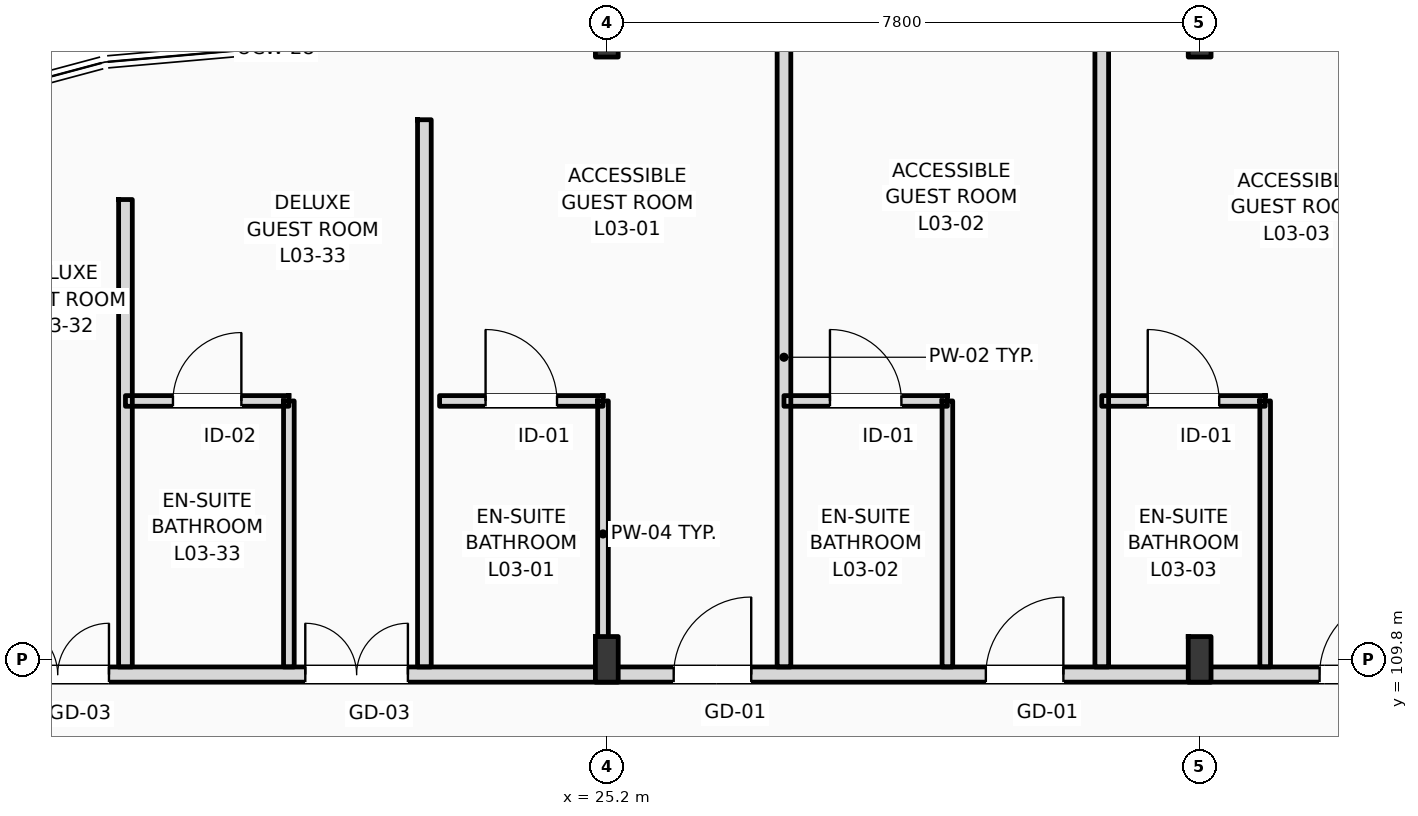
"""IFC4 building model, lengths in metres.
Left out: names, types, materials, properties, quantities, classifications, styles, units other than length and angle.
Written with IfcOpenShell. Run it as: python <this file> out.ifc"""

import sys

from ifc_helpers import new_model, si_unit, direction, frame, frame_2d, origin, origin_2d, place, context, subcontext, project, spatial, rectangle, i_section, extrude, element, fill, save


model = new_model("IFC4")
c1 = context("Model", 3, precision=1e-05, world=origin(), true_north=direction((0.0, 1.0)))
c2 = subcontext(c1, "Body", "Model", "MODEL_VIEW")
j1 = project(units=[si_unit("LENGTHUNIT", "METRE"), si_unit("PLANEANGLEUNIT", "RADIAN")], contexts=[c1])
p1 = place(None, origin())
s1 = spatial("IfcSite", under=j1, at=p1, CompositionType="ELEMENT")
p2 = place(p1, origin())
s2 = spatial("IfcBuilding", under=s1, at=p2, CompositionType="ELEMENT")
p3 = place(p2, frame((0.0, 0.0, 16.2)))
s3 = spatial("IfcBuildingStorey", under=s2, at=p3, CompositionType="ELEMENT", Elevation=16.2)
p4 = place(p3, frame((25.2, 109.8, 0.0), z_axis=(0.0, 0.0, 1.0), x_axis=(1.0, 0.0, 0.0)))
e1 = element("IfcColumn", 1, at=p4, inside=s3, PredefinedType="COLUMN", context=c2, shape_type="SweptSolid", body=[
    extrude(i_section(OverallWidth=0.3, OverallDepth=0.6, WebThickness=0.015, FlangeThickness=0.03, FilletRadius=0.027, at=origin_2d()), origin(), (0.0, 0.0, 1.0), 4.2),
])
p5 = place(p3, frame((25.2, 118.0, 0.0), z_axis=(0.0, 0.0, 1.0), x_axis=(1.0, 0.0, 0.0)))
e2 = element("IfcColumn", 2, at=p5, inside=s3, PredefinedType="COLUMN", context=c2, shape_type="SweptSolid", body=[
    extrude(i_section(OverallWidth=0.3, OverallDepth=0.55, WebThickness=0.015, FlangeThickness=0.029, FilletRadius=0.027, at=origin_2d()), origin(), (0.0, 0.0, 1.0), 4.2),
])
p6 = place(p3, frame((33.0, 109.8, 0.0), z_axis=(0.0, 0.0, 1.0), x_axis=(1.0, 0.0, 0.0)))
e3 = element("IfcColumn", 3, at=p6, inside=s3, PredefinedType="COLUMN", context=c2, shape_type="SweptSolid", body=[
    extrude(i_section(OverallWidth=0.3, OverallDepth=0.6, WebThickness=0.015, FlangeThickness=0.03, FilletRadius=0.027, at=origin_2d()), origin(), (0.0, 0.0, 1.0), 4.2),
])
p7 = place(p3, frame((33.0, 118.0, 0.0), z_axis=(0.0, 0.0, 1.0), x_axis=(1.0, 0.0, 0.0)))
e4 = element("IfcColumn", 4, at=p7, inside=s3, PredefinedType="COLUMN", context=c2, shape_type="SweptSolid", body=[
    extrude(i_section(OverallWidth=0.3, OverallDepth=0.55, WebThickness=0.015, FlangeThickness=0.029, FilletRadius=0.027, at=origin_2d()), origin(), (0.0, 0.0, 1.0), 4.2),
])
p8 = place(p3, frame((10.65, 109.6, 0.0), z_axis=(0.0, 0.0, 1.0), x_axis=(1.0, 0.0, 0.0)))
e5 = element("IfcWall", 5, at=p8, inside=s3, PredefinedType="PARTITIONING", context=c2, shape_type="SweptSolid", body=[
    extrude(rectangle(XDim=109.21, YDim=0.2, at=frame_2d((54.605, 0.0))), origin(), (0.0, 0.0, 1.0), 3.36),
])
p9 = place(p8, frame((15.43, 0.0, 0.0)))
e6 = element("IfcOpeningElement", 6, at=p9, cuts=e5, PredefinedType="OPENING", context=c2, shape_type="SweptSolid", body=[
    extrude(rectangle(XDim=1.02, YDim=2.2, at=frame_2d((0.51, 1.1))), frame((0.0, 0.11, 0.0), z_axis=(0.0, -1.0, 0.0), x_axis=(1.0, 0.0, 0.0)), (0.0, 0.0, 1.0), 0.22),
])
p10 = place(p8, frame((19.537, 0.0, 0.0)))
e7 = element("IfcOpeningElement", 7, at=p10, cuts=e5, PredefinedType="OPENING", context=c2, shape_type="SweptSolid", body=[
    extrude(rectangle(XDim=1.02, YDim=2.2, at=frame_2d((0.51, 1.1))), frame((0.0, 0.11, 0.0), z_axis=(0.0, -1.0, 0.0), x_axis=(1.0, 0.0, 0.0)), (0.0, 0.0, 1.0), 0.22),
])
p11 = place(p8, frame((23.928, 0.0, 0.0)))
e8 = element("IfcOpeningElement", 8, at=p11, cuts=e5, PredefinedType="OPENING", context=c2, shape_type="SweptSolid", body=[
    extrude(rectangle(XDim=1.02, YDim=2.2, at=frame_2d((0.51, 1.1))), frame((0.0, 0.11, 0.0), z_axis=(0.0, -1.0, 0.0), x_axis=(1.0, 0.0, 0.0)), (0.0, 0.0, 1.0), 0.22),
])
p12 = place(p8, frame((26.169, 0.0, 0.0)))
e9 = element("IfcOpeningElement", 9, at=p12, cuts=e5, PredefinedType="OPENING", context=c2, shape_type="SweptSolid", body=[
    extrude(rectangle(XDim=1.02, YDim=2.2, at=frame_2d((0.51, 1.1))), frame((0.0, 0.11, 0.0), z_axis=(0.0, -1.0, 0.0), x_axis=(1.0, 0.0, 0.0)), (0.0, 0.0, 1.0), 0.22),
])
p13 = place(p8, frame((32.739, 0.0, 0.0)))
e10 = element("IfcOpeningElement", 10, at=p13, cuts=e5, PredefinedType="OPENING", context=c2, shape_type="SweptSolid", body=[
    extrude(rectangle(XDim=0.96, YDim=2.2, at=frame_2d((0.48, 1.1))), frame((0.0, 0.11, 0.0), z_axis=(0.0, -1.0, 0.0), x_axis=(1.0, 0.0, 0.0)), (0.0, 0.0, 1.0), 0.22),
])
p14 = place(p8, frame((34.98, 0.0, 0.0)))
e11 = element("IfcOpeningElement", 11, at=p14, cuts=e5, PredefinedType="OPENING", context=c2, shape_type="SweptSolid", body=[
    extrude(rectangle(XDim=0.96, YDim=2.2, at=frame_2d((0.48, 1.1))), frame((0.0, 0.11, 0.0), z_axis=(0.0, -1.0, 0.0), x_axis=(1.0, 0.0, 0.0)), (0.0, 0.0, 1.0), 0.22),
])
p15 = place(p8, frame((41.521, 0.0, 0.0)))
e12 = element("IfcOpeningElement", 12, at=p15, cuts=e5, PredefinedType="OPENING", context=c2, shape_type="SweptSolid", body=[
    extrude(rectangle(XDim=0.96, YDim=2.2, at=frame_2d((0.48, 1.1))), frame((0.0, 0.11, 0.0), z_axis=(0.0, -1.0, 0.0), x_axis=(1.0, 0.0, 0.0)), (0.0, 0.0, 1.0), 0.22),
])
p16 = place(p8, frame((43.512, 0.0, 0.0)))
e13 = element("IfcOpeningElement", 13, at=p16, cuts=e5, PredefinedType="OPENING", context=c2, shape_type="SweptSolid", body=[
    extrude(rectangle(XDim=0.96, YDim=2.2, at=frame_2d((0.48, 1.1))), frame((0.0, 0.11, 0.0), z_axis=(0.0, -1.0, 0.0), x_axis=(1.0, 0.0, 0.0)), (0.0, 0.0, 1.0), 0.22),
])
p17 = place(p8, frame((50.303, 0.0, 0.0)))
e14 = element("IfcOpeningElement", 14, at=p17, cuts=e5, PredefinedType="OPENING", context=c2, shape_type="SweptSolid", body=[
    extrude(rectangle(XDim=0.96, YDim=2.2, at=frame_2d((0.48, 1.1))), frame((0.0, 0.11, 0.0), z_axis=(0.0, -1.0, 0.0), x_axis=(1.0, 0.0, 0.0)), (0.0, 0.0, 1.0), 0.22),
])
p18 = place(p8, frame((54.944, 0.0, 0.0)))
e15 = element("IfcOpeningElement", 15, at=p18, cuts=e5, PredefinedType="OPENING", context=c2, shape_type="SweptSolid", body=[
    extrude(rectangle(XDim=0.96, YDim=2.2, at=frame_2d((0.48, 1.1))), frame((0.0, 0.11, 0.0), z_axis=(0.0, -1.0, 0.0), x_axis=(1.0, 0.0, 0.0)), (0.0, 0.0, 1.0), 0.22),
])
p19 = place(p8, frame((59.085, 0.0, 0.0)))
e16 = element("IfcOpeningElement", 16, at=p19, cuts=e5, PredefinedType="OPENING", context=c2, shape_type="SweptSolid", body=[
    extrude(rectangle(XDim=0.96, YDim=2.2, at=frame_2d((0.48, 1.1))), frame((0.0, 0.11, 0.0), z_axis=(0.0, -1.0, 0.0), x_axis=(1.0, 0.0, 0.0)), (0.0, 0.0, 1.0), 0.22),
])
p20 = place(p8, frame((63.476, 0.0, 0.0)))
e17 = element("IfcOpeningElement", 17, at=p20, cuts=e5, PredefinedType="OPENING", context=c2, shape_type="SweptSolid", body=[
    extrude(rectangle(XDim=0.96, YDim=2.2, at=frame_2d((0.48, 1.1))), frame((0.0, 0.11, 0.0), z_axis=(0.0, -1.0, 0.0), x_axis=(1.0, 0.0, 0.0)), (0.0, 0.0, 1.0), 0.22),
])
p21 = place(p8, frame((65.716, 0.0, 0.0)))
e18 = element("IfcOpeningElement", 18, at=p21, cuts=e5, PredefinedType="OPENING", context=c2, shape_type="SweptSolid", body=[
    extrude(rectangle(XDim=0.96, YDim=2.2, at=frame_2d((0.48, 1.1))), frame((0.0, 0.11, 0.0), z_axis=(0.0, -1.0, 0.0), x_axis=(1.0, 0.0, 0.0)), (0.0, 0.0, 1.0), 0.22),
])
p22 = place(p8, frame((72.257, 0.0, 0.0)))
e19 = element("IfcOpeningElement", 19, at=p22, cuts=e5, PredefinedType="OPENING", context=c2, shape_type="SweptSolid", body=[
    extrude(rectangle(XDim=0.96, YDim=2.2, at=frame_2d((0.48, 1.1))), frame((0.0, 0.11, 0.0), z_axis=(0.0, -1.0, 0.0), x_axis=(1.0, 0.0, 0.0)), (0.0, 0.0, 1.0), 0.22),
])
p23 = place(p8, frame((74.498, 0.0, 0.0)))
e20 = element("IfcOpeningElement", 20, at=p23, cuts=e5, PredefinedType="OPENING", context=c2, shape_type="SweptSolid", body=[
    extrude(rectangle(XDim=0.96, YDim=2.2, at=frame_2d((0.48, 1.1))), frame((0.0, 0.11, 0.0), z_axis=(0.0, -1.0, 0.0), x_axis=(1.0, 0.0, 0.0)), (0.0, 0.0, 1.0), 0.22),
])
p24 = place(p8, frame((81.039, 0.0, 0.0)))
e21 = element("IfcOpeningElement", 21, at=p24, cuts=e5, PredefinedType="OPENING", context=c2, shape_type="SweptSolid", body=[
    extrude(rectangle(XDim=0.96, YDim=2.2, at=frame_2d((0.48, 1.1))), frame((0.0, 0.11, 0.0), z_axis=(0.0, -1.0, 0.0), x_axis=(1.0, 0.0, 0.0)), (0.0, 0.0, 1.0), 0.22),
])
p25 = place(p8, frame((85.68, 0.0, 0.0)))
e22 = element("IfcOpeningElement", 22, at=p25, cuts=e5, PredefinedType="OPENING", context=c2, shape_type="SweptSolid", body=[
    extrude(rectangle(XDim=0.96, YDim=2.2, at=frame_2d((0.48, 1.1))), frame((0.0, 0.11, 0.0), z_axis=(0.0, -1.0, 0.0), x_axis=(1.0, 0.0, 0.0)), (0.0, 0.0, 1.0), 0.22),
])
p26 = place(p8, frame((89.82, 0.0, 0.0)))
e23 = element("IfcOpeningElement", 23, at=p26, cuts=e5, PredefinedType="OPENING", context=c2, shape_type="SweptSolid", body=[
    extrude(rectangle(XDim=0.96, YDim=2.2, at=frame_2d((0.48, 1.1))), frame((0.0, 0.11, 0.0), z_axis=(0.0, -1.0, 0.0), x_axis=(1.0, 0.0, 0.0)), (0.0, 0.0, 1.0), 0.22),
])
p27 = place(p8, frame((94.211, 0.0, 0.0)))
e24 = element("IfcOpeningElement", 24, at=p27, cuts=e5, PredefinedType="OPENING", context=c2, shape_type="SweptSolid", body=[
    extrude(rectangle(XDim=0.96, YDim=2.2, at=frame_2d((0.48, 1.1))), frame((0.0, 0.11, 0.0), z_axis=(0.0, -1.0, 0.0), x_axis=(1.0, 0.0, 0.0)), (0.0, 0.0, 1.0), 0.22),
])
p28 = place(p8, frame((98.602, 0.0, 0.0)))
e25 = element("IfcOpeningElement", 25, at=p28, cuts=e5, PredefinedType="OPENING", context=c2, shape_type="SweptSolid", body=[
    extrude(rectangle(XDim=0.96, YDim=2.2, at=frame_2d((0.48, 1.1))), frame((0.0, 0.11, 0.0), z_axis=(0.0, -1.0, 0.0), x_axis=(1.0, 0.0, 0.0)), (0.0, 0.0, 1.0), 0.22),
])
p29 = place(p8, frame((102.993, 0.0, 0.0)))
e26 = element("IfcOpeningElement", 26, at=p29, cuts=e5, PredefinedType="OPENING", context=c2, shape_type="SweptSolid", body=[
    extrude(rectangle(XDim=0.96, YDim=2.2, at=frame_2d((0.48, 1.1))), frame((0.0, 0.11, 0.0), z_axis=(0.0, -1.0, 0.0), x_axis=(1.0, 0.0, 0.0)), (0.0, 0.0, 1.0), 0.22),
])
p30 = place(p8, frame((105.269, 0.0, 0.0)))
e27 = element("IfcOpeningElement", 27, at=p30, cuts=e5, PredefinedType="OPENING", context=c2, shape_type="SweptSolid", body=[
    extrude(rectangle(XDim=0.96, YDim=2.2, at=frame_2d((0.48, 1.1))), frame((0.0, 0.11, 0.0), z_axis=(0.0, -1.0, 0.0), x_axis=(1.0, 0.0, 0.0)), (0.0, 0.0, 1.0), 0.22),
])
p31 = place(p8, frame((2.716, 0.0, 0.0)))
e28 = element("IfcOpeningElement", 28, at=p31, cuts=e5, PredefinedType="OPENING", context=c2, shape_type="SweptSolid", body=[
    extrude(rectangle(XDim=1.35, YDim=2.25, at=frame_2d((0.675, 1.125))), frame((0.0, 0.11, 0.0), z_axis=(0.0, -1.0, 0.0), x_axis=(1.0, 0.0, 0.0)), (0.0, 0.0, 1.0), 0.22),
])
p32 = place(p8, frame((6.65, 0.0, 0.0)))
e29 = element("IfcOpeningElement", 29, at=p32, cuts=e5, PredefinedType="OPENING", context=c2, shape_type="SweptSolid", body=[
    extrude(rectangle(XDim=1.35, YDim=2.25, at=frame_2d((0.675, 1.125))), frame((0.0, 0.11, 0.0), z_axis=(0.0, -1.0, 0.0), x_axis=(1.0, 0.0, 0.0)), (0.0, 0.0, 1.0), 0.22),
])
p33 = place(p8, frame((10.583, 0.0, 0.0)))
e30 = element("IfcOpeningElement", 30, at=p33, cuts=e5, PredefinedType="OPENING", context=c2, shape_type="SweptSolid", body=[
    extrude(rectangle(XDim=1.35, YDim=2.25, at=frame_2d((0.675, 1.125))), frame((0.0, 0.11, 0.0), z_axis=(0.0, -1.0, 0.0), x_axis=(1.0, 0.0, 0.0)), (0.0, 0.0, 1.0), 0.22),
])
p34 = place(p3, frame((27.531, 109.7, 0.0), z_axis=(0.0, 0.0, 1.0), x_axis=(0.0, 1.0, 0.0)))
e31 = element("IfcWall", 31, at=p34, inside=s3, PredefinedType="PARTITIONING", context=c2, shape_type="SweptSolid", body=[
    extrude(rectangle(XDim=8.15, YDim=0.18, at=frame_2d((4.075, 0.0))), origin(), (0.0, 0.0, 1.0), 3.92),
])
p35 = place(p3, frame((25.15, 109.7, 0.0), z_axis=(0.0, 0.0, 1.0), x_axis=(0.0, 1.0, 0.0)))
e32 = element("IfcWall", 32, at=p35, inside=s3, PredefinedType="PARTITIONING", context=c2, shape_type="SweptSolid", body=[
    extrude(rectangle(XDim=3.5, YDim=0.14, at=frame_2d((1.75, 0.0))), origin(), (0.0, 0.0, 1.0), 3.51),
])
p36 = place(p3, frame((23.0, 113.2, 0.0), z_axis=(0.0, 0.0, 1.0), x_axis=(1.0, 0.0, 0.0)))
e33 = element("IfcWall", 33, at=p36, inside=s3, PredefinedType="PARTITIONING", context=c2, shape_type="SweptSolid", body=[
    extrude(rectangle(XDim=2.15, YDim=0.14, at=frame_2d((1.075, 0.0))), origin(), (0.0, 0.0, 1.0), 3.92),
])
p37 = place(p36, frame((0.605, 0.0, 0.0)))
e34 = element("IfcOpeningElement", 34, at=p37, cuts=e33, PredefinedType="OPENING", context=c2, shape_type="SweptSolid", body=[
    extrude(rectangle(XDim=0.94, YDim=2.15, at=frame_2d((0.47, 1.075))), frame((0.0, 0.08, 0.0), z_axis=(0.0, -1.0, 0.0), x_axis=(1.0, 0.0, 0.0)), (0.0, 0.0, 1.0), 0.16),
])
p38 = place(p3, frame((31.712, 109.7, 0.0), z_axis=(0.0, 0.0, 1.0), x_axis=(0.0, 1.0, 0.0)))
e35 = element("IfcWall", 35, at=p38, inside=s3, PredefinedType="PARTITIONING", context=c2, shape_type="SweptSolid", body=[
    extrude(rectangle(XDim=8.15, YDim=0.18, at=frame_2d((4.075, 0.0))), origin(), (0.0, 0.0, 1.0), 3.92),
])
p39 = place(p3, frame((29.681, 109.7, 0.0), z_axis=(0.0, 0.0, 1.0), x_axis=(0.0, 1.0, 0.0)))
e36 = element("IfcWall", 36, at=p39, inside=s3, PredefinedType="PARTITIONING", context=c2, shape_type="SweptSolid", body=[
    extrude(rectangle(XDim=3.5, YDim=0.14, at=frame_2d((1.75, 0.0))), origin(), (0.0, 0.0, 1.0), 3.92),
])
p40 = place(p3, frame((27.531, 113.2, 0.0), z_axis=(0.0, 0.0, 1.0), x_axis=(1.0, 0.0, 0.0)))
e37 = element("IfcWall", 37, at=p40, inside=s3, PredefinedType="PARTITIONING", context=c2, shape_type="SweptSolid", body=[
    extrude(rectangle(XDim=2.15, YDim=0.14, at=frame_2d((1.075, 0.0))), origin(), (0.0, 0.0, 1.0), 3.92),
])
p41 = place(p40, frame((0.605, 0.0, 0.0)))
e38 = element("IfcOpeningElement", 38, at=p41, cuts=e37, PredefinedType="OPENING", context=c2, shape_type="SweptSolid", body=[
    extrude(rectangle(XDim=0.94, YDim=2.15, at=frame_2d((0.47, 1.075))), frame((0.0, 0.08, 0.0), z_axis=(0.0, -1.0, 0.0), x_axis=(1.0, 0.0, 0.0)), (0.0, 0.0, 1.0), 0.16),
])
p42 = place(p3, frame((33.862, 109.7, 0.0), z_axis=(0.0, 0.0, 1.0), x_axis=(0.0, 1.0, 0.0)))
e39 = element("IfcWall", 39, at=p42, inside=s3, PredefinedType="PARTITIONING", context=c2, shape_type="SweptSolid", body=[
    extrude(rectangle(XDim=3.5, YDim=0.14, at=frame_2d((1.75, 0.0))), origin(), (0.0, 0.0, 1.0), 3.92),
])
p43 = place(p3, frame((31.712, 113.2, 0.0), z_axis=(0.0, 0.0, 1.0), x_axis=(1.0, 0.0, 0.0)))
e40 = element("IfcWall", 40, at=p43, inside=s3, PredefinedType="PARTITIONING", context=c2, shape_type="SweptSolid", body=[
    extrude(rectangle(XDim=2.15, YDim=0.14, at=frame_2d((1.075, 0.0))), origin(), (0.0, 0.0, 1.0), 3.92),
])
p44 = place(p43, frame((0.605, 0.0, 0.0)))
e41 = element("IfcOpeningElement", 41, at=p44, cuts=e40, PredefinedType="OPENING", context=c2, shape_type="SweptSolid", body=[
    extrude(rectangle(XDim=0.94, YDim=2.15, at=frame_2d((0.47, 1.075))), frame((0.0, 0.08, 0.0), z_axis=(0.0, -1.0, 0.0), x_axis=(1.0, 0.0, 0.0)), (0.0, 0.0, 1.0), 0.16),
])
p45 = place(p3, frame((18.867, 109.7, 0.0), z_axis=(0.0, 0.0, 1.0), x_axis=(0.0, 1.0, 0.0)))
e42 = element("IfcWall", 42, at=p45, inside=s3, PredefinedType="PARTITIONING", context=c2, shape_type="SweptSolid", body=[
    extrude(rectangle(XDim=6.15, YDim=0.18, at=frame_2d((3.075, 0.0))), origin(), (0.0, 0.0, 1.0), 3.92),
])
p46 = place(p3, frame((22.8, 109.7, 0.0), z_axis=(0.0, 0.0, 1.0), x_axis=(0.0, 1.0, 0.0)))
e43 = element("IfcWall", 43, at=p46, inside=s3, PredefinedType="PARTITIONING", context=c2, shape_type="SweptSolid", body=[
    extrude(rectangle(XDim=7.2, YDim=0.18, at=frame_2d((3.6, 0.0))), origin(), (0.0, 0.0, 1.0), 3.92),
])
p47 = place(p3, frame((21.017, 109.7, 0.0), z_axis=(0.0, 0.0, 1.0), x_axis=(0.0, 1.0, 0.0)))
e44 = element("IfcWall", 44, at=p47, inside=s3, PredefinedType="PARTITIONING", context=c2, shape_type="SweptSolid", body=[
    extrude(rectangle(XDim=3.5, YDim=0.14, at=frame_2d((1.75, 0.0))), origin(), (0.0, 0.0, 1.0), 3.92),
])
p48 = place(p3, frame((18.867, 113.2, 0.0), z_axis=(0.0, 0.0, 1.0), x_axis=(1.0, 0.0, 0.0)))
e45 = element("IfcWall", 45, at=p48, inside=s3, PredefinedType="PARTITIONING", context=c2, shape_type="SweptSolid", body=[
    extrude(rectangle(XDim=2.15, YDim=0.14, at=frame_2d((1.075, 0.0))), origin(), (0.0, 0.0, 1.0), 3.92),
])
p49 = place(p48, frame((0.625, 0.0, 0.0)))
e46 = element("IfcOpeningElement", 46, at=p49, cuts=e45, PredefinedType="OPENING", context=c2, shape_type="SweptSolid", body=[
    extrude(rectangle(XDim=0.9, YDim=2.1, at=frame_2d((0.45, 1.05))), frame((0.0, 0.08, 0.0), z_axis=(0.0, -1.0, 0.0), x_axis=(1.0, 0.0, 0.0)), (0.0, 0.0, 1.0), 0.16),
])
p50 = place(p9, origin())
e47 = element("IfcDoor", 47, at=p50, inside=s3, OperationType="SINGLE_SWING_RIGHT", PredefinedType="DOOR", context=c2, shape_type="SweptSolid", body=[
    extrude(rectangle(XDim=1.02, YDim=2.2, at=frame_2d((0.51, 1.1))), frame((0.0, 0.025, 0.0), z_axis=(0.0, -1.0, 0.0), x_axis=(1.0, 0.0, 0.0)), (0.0, 0.0, 1.0), 0.05),
])
fill(e6, e47)
p51 = place(p37, origin())
e48 = element("IfcDoor", 48, at=p51, inside=s3, OperationType="SINGLE_SWING_LEFT", PredefinedType="DOOR", context=c2, shape_type="SweptSolid", body=[
    extrude(rectangle(XDim=0.94, YDim=2.15, at=frame_2d((0.47, 1.075))), frame((0.0, 0.025, 0.0), z_axis=(0.0, -1.0, 0.0), x_axis=(1.0, 0.0, 0.0)), (0.0, 0.0, 1.0), 0.05),
])
fill(e34, e48)
p52 = place(p10, origin())
e49 = element("IfcDoor", 49, at=p52, inside=s3, OperationType="SINGLE_SWING_RIGHT", PredefinedType="DOOR", context=c2, shape_type="SweptSolid", body=[
    extrude(rectangle(XDim=1.02, YDim=2.2, at=frame_2d((0.51, 1.1))), frame((0.0, 0.025, 0.0), z_axis=(0.0, -1.0, 0.0), x_axis=(1.0, 0.0, 0.0)), (0.0, 0.0, 1.0), 0.05),
])
fill(e7, e49)
p53 = place(p41, origin())
e50 = element("IfcDoor", 50, at=p53, inside=s3, OperationType="SINGLE_SWING_LEFT", PredefinedType="DOOR", context=c2, shape_type="SweptSolid", body=[
    extrude(rectangle(XDim=0.94, YDim=2.15, at=frame_2d((0.47, 1.075))), frame((0.0, 0.025, 0.0), z_axis=(0.0, -1.0, 0.0), x_axis=(1.0, 0.0, 0.0)), (0.0, 0.0, 1.0), 0.05),
])
fill(e38, e50)
p54 = place(p11, origin())
e51 = element("IfcDoor", 51, at=p54, inside=s3, OperationType="SINGLE_SWING_RIGHT", PredefinedType="DOOR", context=c2, shape_type="SweptSolid", body=[
    extrude(rectangle(XDim=1.02, YDim=2.2, at=frame_2d((0.51, 1.1))), frame((0.0, 0.025, 0.0), z_axis=(0.0, -1.0, 0.0), x_axis=(1.0, 0.0, 0.0)), (0.0, 0.0, 1.0), 0.05),
])
fill(e8, e51)
p55 = place(p44, origin())
e52 = element("IfcDoor", 52, at=p55, inside=s3, OperationType="SINGLE_SWING_LEFT", PredefinedType="DOOR", context=c2, shape_type="SweptSolid", body=[
    extrude(rectangle(XDim=0.94, YDim=2.15, at=frame_2d((0.47, 1.075))), frame((0.0, 0.025, 0.0), z_axis=(0.0, -1.0, 0.0), x_axis=(1.0, 0.0, 0.0)), (0.0, 0.0, 1.0), 0.05),
])
fill(e41, e52)
p56 = place(p32, origin())
e53 = element("IfcDoor", 53, at=p56, inside=s3, OperationType="DOUBLE_SWING_LEFT", PredefinedType="DOOR", context=c2, shape_type="SweptSolid", body=[
    extrude(rectangle(XDim=1.35, YDim=2.25, at=frame_2d((0.675, 1.125))), frame((0.0, 0.025, 0.0), z_axis=(0.0, -1.0, 0.0), x_axis=(1.0, 0.0, 0.0)), (0.0, 0.0, 1.0), 0.05),
])
fill(e29, e53)
p57 = place(p33, origin())
e54 = element("IfcDoor", 54, at=p57, inside=s3, OperationType="DOUBLE_SWING_LEFT", PredefinedType="DOOR", context=c2, shape_type="SweptSolid", body=[
    extrude(rectangle(XDim=1.35, YDim=2.25, at=frame_2d((0.675, 1.125))), frame((0.0, 0.025, 0.0), z_axis=(0.0, -1.0, 0.0), x_axis=(1.0, 0.0, 0.0)), (0.0, 0.0, 1.0), 0.05),
])
fill(e30, e54)
p58 = place(p49, origin())
e55 = element("IfcDoor", 55, at=p58, inside=s3, OperationType="SINGLE_SWING_RIGHT", PredefinedType="DOOR", context=c2, shape_type="SweptSolid", body=[
    extrude(rectangle(XDim=0.9, YDim=2.1, at=frame_2d((0.45, 1.05))), frame((0.0, 0.025, 0.0), z_axis=(0.0, -1.0, 0.0), x_axis=(1.0, 0.0, 0.0)), (0.0, 0.0, 1.0), 0.05),
])
fill(e46, e55)
save(model, sys.argv[1])
